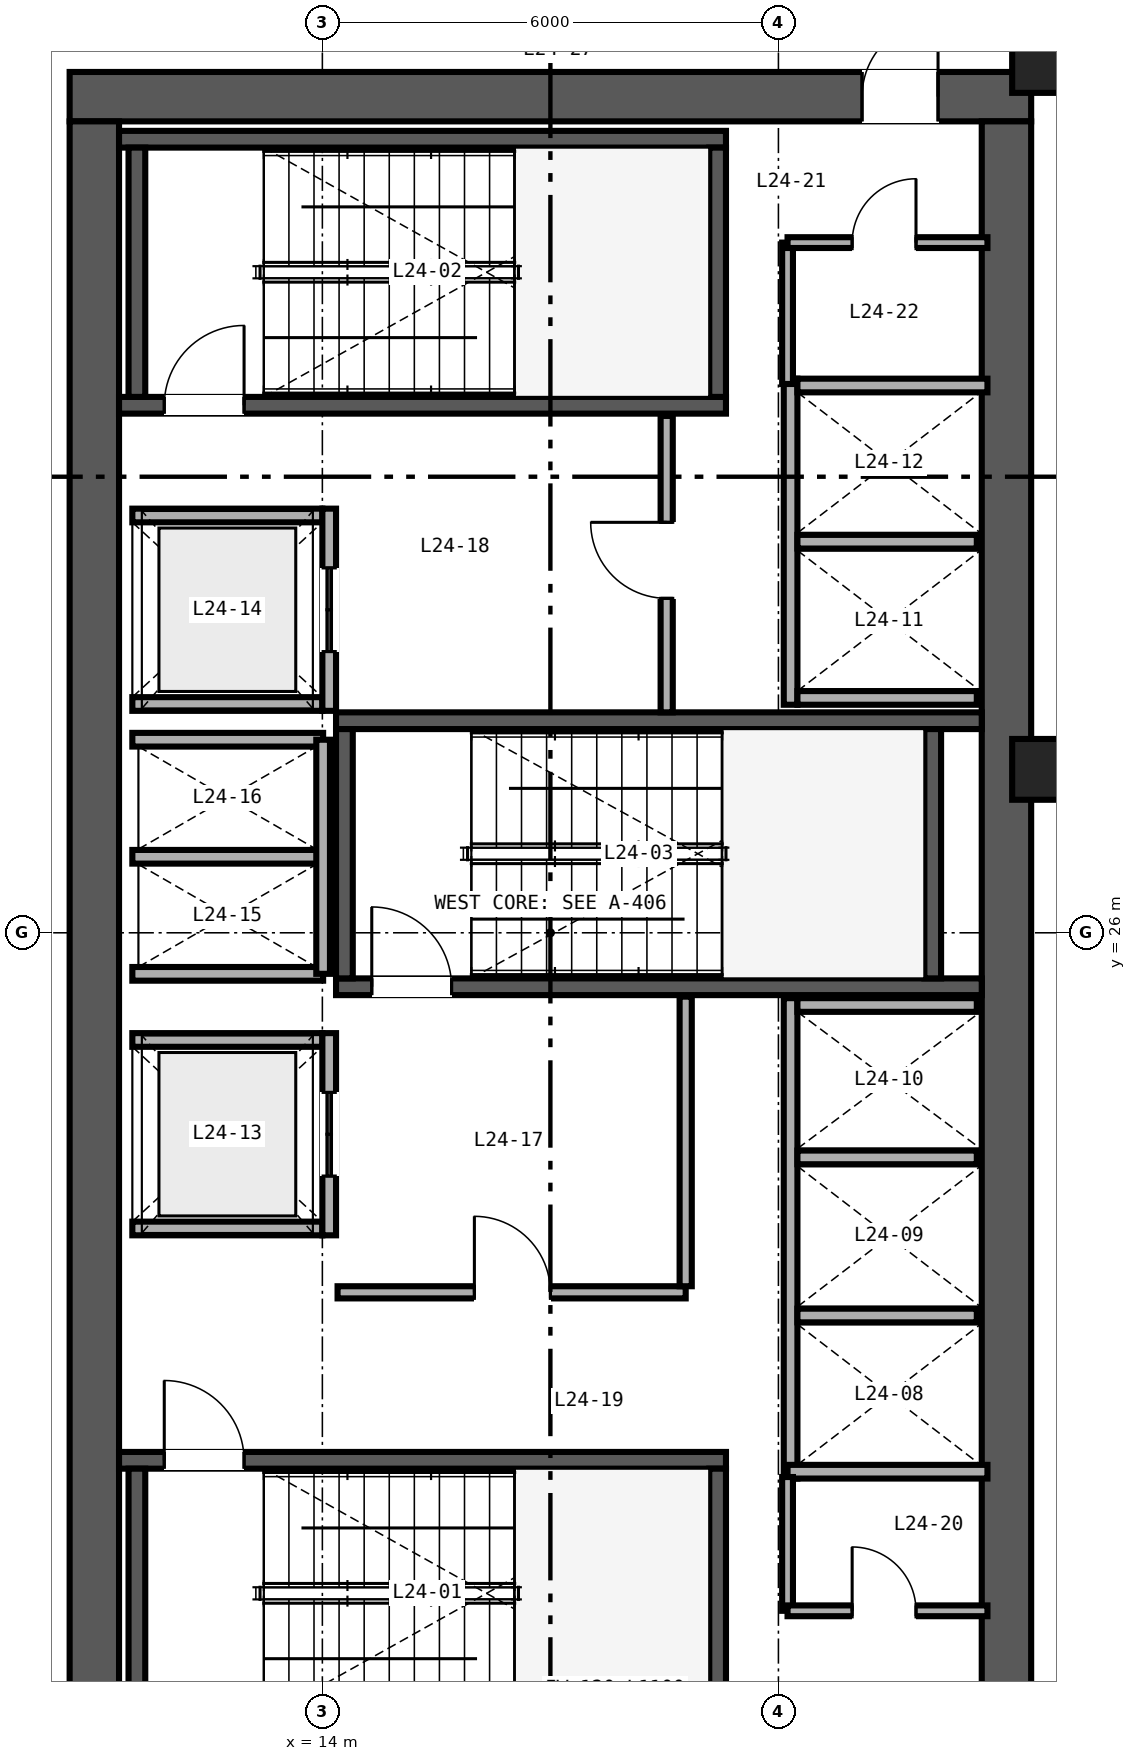
"""IFC4 building model, lengths in metres.
Left out: names, types, materials, properties, quantities, classifications, styles, units other than length and angle.
Written with IfcOpenShell. Run it as: python <this file> out.ifc"""

import sys

from ifc_helpers import new_model, si_unit, direction, frame, frame_2d, origin, origin_2d, place, context, subcontext, project, spatial, rectangle, hollow_rectangle, extrude, source, transform, mapped, element, fill, save


model = new_model("IFC4")
c1 = context("Model", 3, precision=1e-05, world=origin(), true_north=direction((0.0, 1.0)))
c2 = subcontext(c1, "Body", "Model", "MODEL_VIEW")
j1 = project(units=[si_unit("LENGTHUNIT", "METRE"), si_unit("PLANEANGLEUNIT", "RADIAN")], contexts=[c1])
p1 = place(None, origin())
s1 = spatial("IfcSite", under=j1, at=p1, CompositionType="ELEMENT")
p2 = place(p1, origin())
s2 = spatial("IfcBuilding", under=s1, at=p2, CompositionType="ELEMENT")
p3 = place(p2, frame((0.0, 0.0, 100.8)))
s3 = spatial("IfcBuildingStorey", under=s2, at=p3, CompositionType="ELEMENT", Elevation=100.8)
p4 = place(p3, frame((10.675, 37.0, 0.0), z_axis=(0.0, 0.0, 1.0), x_axis=(1.0, 0.0, 0.0)))
e1 = element("IfcWall", 1, at=p4, inside=s3, PredefinedType="SHEAR", context=c2, shape_type="SweptSolid", body=[
    extrude(rectangle(XDim=12.65, YDim=0.65, at=frame_2d((6.325, 0.0))), origin(), (0.0, 0.0, 1.0), 3.36),
])
p5 = place(p4, frame((10.425, 0.0, 0.0)))
e2 = element("IfcOpeningElement", 2, at=p5, cuts=e1, PredefinedType="OPENING", context=c2, shape_type="SweptSolid", body=[
    extrude(rectangle(XDim=1.0, YDim=2.15, at=frame_2d((0.5, 1.075))), frame((0.0, 0.335, 0.0), z_axis=(0.0, -1.0, 0.0), x_axis=(1.0, 0.0, 0.0)), (0.0, 0.0, 1.0), 0.67),
])
for number, where, z_axis, x_axis in (
    (3, (11.0, 15.325, 0.0), (0.0, 0.0, 1.0), (0.0, 1.0, 0.0)),
    (4, (23.0, 15.325, 0.0), (0.0, 0.0, 1.0), (0.0, 1.0, 0.0)),
):
    element("IfcWall", number, at=place(p3, frame(where, z_axis=z_axis, x_axis=x_axis)), inside=s3, PredefinedType="SHEAR", context=c2, shape_type="SweptSolid", body=[
        extrude(rectangle(XDim=21.35, YDim=0.65, at=frame_2d((10.675, 0.0))), origin(), (0.0, 0.0, 1.0), 3.36),
    ])
p6 = place(p3, frame((11.325, 19.06, 0.0), z_axis=(0.0, 0.0, 1.0), x_axis=(1.0, 0.0, 0.0)))
e5 = element("IfcWall", 5, at=p6, inside=s3, PredefinedType="SHEAR", context=c2, shape_type="SweptSolid", body=[
    extrude(rectangle(XDim=7.985, YDim=0.22, at=frame_2d((3.993, 0.0))), origin(), (0.0, 0.0, 1.0), 3.4),
])
p7 = place(p6, frame((0.595, 0.0, 0.0)))
e6 = element("IfcOpeningElement", 6, at=p7, cuts=e5, PredefinedType="OPENING", context=c2, shape_type="SweptSolid", body=[
    extrude(rectangle(XDim=1.05, YDim=2.15, at=frame_2d((0.525, 1.075))), frame((0.0, 0.12, 0.0), z_axis=(0.0, -1.0, 0.0), x_axis=(1.0, 0.0, 0.0)), (0.0, 0.0, 1.0), 0.24),
])
for number, where, z_axis, x_axis in (
    (7, (11.56, 15.67, 0.0), (0.0, 0.0, 1.0), (0.0, 1.0, 0.0)),
    (8, (19.2, 15.67, 0.0), (0.0, 0.0, 1.0), (0.0, 1.0, 0.0)),
):
    element("IfcWall", number, at=place(p3, frame(where, z_axis=z_axis, x_axis=x_axis)), inside=s3, PredefinedType="SHEAR", context=c2, shape_type="SweptSolid", body=[
        extrude(rectangle(XDim=3.28, YDim=0.22, at=frame_2d((1.64, 0.0))), origin(), (0.0, 0.0, 1.0), 3.4),
    ])
p8 = place(p3, frame((11.325, 32.94, 0.0), z_axis=(0.0, 0.0, 1.0), x_axis=(1.0, 0.0, 0.0)))
e9 = element("IfcWall", 9, at=p8, inside=s3, PredefinedType="SHEAR", context=c2, shape_type="SweptSolid", body=[
    extrude(rectangle(XDim=7.985, YDim=0.22, at=frame_2d((3.993, 0.0))), origin(), (0.0, 0.0, 1.0), 3.4),
])
p9 = place(p8, frame((0.595, 0.0, 0.0)))
e10 = element("IfcOpeningElement", 10, at=p9, cuts=e9, PredefinedType="OPENING", context=c2, shape_type="SweptSolid", body=[
    extrude(rectangle(XDim=1.05, YDim=2.15, at=frame_2d((0.525, 1.075))), frame((0.0, 0.12, 0.0), z_axis=(0.0, -1.0, 0.0), x_axis=(1.0, 0.0, 0.0)), (0.0, 0.0, 1.0), 0.24),
])
p10 = place(p3, frame((11.325, 36.44, 0.0), z_axis=(0.0, 0.0, 1.0), x_axis=(1.0, 0.0, 0.0)))
e11 = element("IfcWall", 11, at=p10, inside=s3, PredefinedType="SHEAR", context=c2, shape_type="SweptSolid", body=[
    extrude(rectangle(XDim=7.985, YDim=0.22, at=frame_2d((3.993, 0.0))), origin(), (0.0, 0.0, 1.0), 3.4),
])
for number, where, z_axis, x_axis in (
    (12, (11.56, 33.05, 0.0), (0.0, 0.0, 1.0), (0.0, 1.0, 0.0)),
    (13, (19.2, 33.05, 0.0), (0.0, 0.0, 1.0), (0.0, 1.0, 0.0)),
):
    element("IfcWall", number, at=place(p3, frame(where, z_axis=z_axis, x_axis=x_axis)), inside=s3, PredefinedType="SHEAR", context=c2, shape_type="SweptSolid", body=[
        extrude(rectangle(XDim=3.28, YDim=0.22, at=frame_2d((1.64, 0.0))), origin(), (0.0, 0.0, 1.0), 3.4),
    ])
p11 = place(p3, frame((14.18, 25.29, 0.0), z_axis=(0.0, 0.0, 1.0), x_axis=(1.0, 0.0, 0.0)))
e14 = element("IfcWall", 14, at=p11, inside=s3, PredefinedType="SHEAR", context=c2, shape_type="SweptSolid", body=[
    extrude(rectangle(XDim=8.495, YDim=0.22, at=frame_2d((4.248, 0.0))), origin(), (0.0, 0.0, 1.0), 3.4),
])
p12 = place(p11, frame((0.47, 0.0, 0.0)))
e15 = element("IfcOpeningElement", 15, at=p12, cuts=e14, PredefinedType="OPENING", context=c2, shape_type="SweptSolid", body=[
    extrude(rectangle(XDim=1.05, YDim=2.15, at=frame_2d((0.525, 1.075))), frame((0.0, 0.12, 0.0), z_axis=(0.0, -1.0, 0.0), x_axis=(1.0, 0.0, 0.0)), (0.0, 0.0, 1.0), 0.24),
])
p13 = place(p3, frame((14.18, 28.79, 0.0), z_axis=(0.0, 0.0, 1.0), x_axis=(1.0, 0.0, 0.0)))
e16 = element("IfcWall", 16, at=p13, inside=s3, PredefinedType="SHEAR", context=c2, shape_type="SweptSolid", body=[
    extrude(rectangle(XDim=8.495, YDim=0.22, at=frame_2d((4.248, 0.0))), origin(), (0.0, 0.0, 1.0), 3.4),
])
for number, where, z_axis, x_axis in (
    (17, (14.29, 25.4, 0.0), (0.0, 0.0, 1.0), (0.0, 1.0, 0.0)),
    (18, (22.03, 25.4, 0.0), (0.0, 0.0, 1.0), (0.0, 1.0, 0.0)),
):
    element("IfcWall", number, at=place(p3, frame(where, z_axis=z_axis, x_axis=x_axis)), inside=s3, PredefinedType="SHEAR", context=c2, shape_type="SweptSolid", body=[
        extrude(rectangle(XDim=3.28, YDim=0.22, at=frame_2d((1.64, 0.0))), origin(), (0.0, 0.0, 1.0), 3.4),
    ])
m1 = source(origin(), c2, "Body", "SweptSolid", [
    extrude(hollow_rectangle(XDim=0.85, YDim=0.8, WallThickness=0.032, at=origin_2d()), origin(), (0.0, 0.0, 1.0), 3.36),
])
for number, where, z_axis, x_axis in (
    (19, (23.5, 28.15, 0.0), (0.0, 0.0, 1.0), (1.0, 0.0, 0.0)),
    (20, (23.5, 37.45, 0.0), (0.0, 0.0, 1.0), (1.0, 0.0, 0.0)),
):
    element("IfcColumn", number, at=place(p3, frame(where, z_axis=z_axis, x_axis=x_axis)), inside=s3, PredefinedType="COLUMN", context=c2, shape_type="MappedRepresentation", body=[
        mapped(m1, transform((0.0, 0.0, 0.0), scale=1.0)),
    ])
p14 = place(p3, frame((20.16, 18.82, 0.0), z_axis=(0.0, 0.0, 1.0), x_axis=(0.0, 1.0, 0.0)))
e21 = element("IfcWall", 21, at=p14, inside=s3, PredefinedType="SOLIDWALL", context=c2, shape_type="SweptSolid", body=[
    extrude(rectangle(XDim=6.32, YDim=0.18, at=frame_2d((3.16, 0.0))), origin(), (0.0, 0.0, 1.0), 2.36),
])
p15 = place(p3, frame((20.12, 18.91, 0.0), z_axis=(0.0, 0.0, 1.0), x_axis=(1.0, 0.0, 0.0)))
e22 = element("IfcWall", 22, at=p15, inside=s3, PredefinedType="SOLIDWALL", context=c2, shape_type="SweptSolid", body=[
    extrude(rectangle(XDim=2.63, YDim=0.18, at=frame_2d((1.315, 0.0))), origin(), (0.0, 0.0, 1.0), 3.36),
])
p16 = place(p3, frame((20.25, 25.05, 0.0), z_axis=(0.0, 0.0, 1.0), x_axis=(1.0, 0.0, 0.0)))
e23 = element("IfcWall", 23, at=p16, inside=s3, PredefinedType="SOLIDWALL", context=c2, shape_type="SweptSolid", body=[
    extrude(rectangle(XDim=2.36, YDim=0.18, at=frame_2d((1.18, 0.0))), origin(), (0.0, 0.0, 1.0), 3.36),
])
p17 = place(p3, frame((20.25, 20.965, 0.0), z_axis=(0.0, 0.0, 1.0), x_axis=(1.0, 0.0, 0.0)))
e24 = element("IfcWall", 24, at=p17, inside=s3, PredefinedType="SOLIDWALL", context=c2, shape_type="SweptSolid", body=[
    extrude(rectangle(XDim=2.36, YDim=0.18, at=frame_2d((1.18, 0.0))), origin(), (0.0, 0.0, 1.0), 2.36),
])
p18 = place(p3, frame((20.25, 23.045, 0.0), z_axis=(0.0, 0.0, 1.0), x_axis=(1.0, 0.0, 0.0)))
e25 = element("IfcWall", 25, at=p18, inside=s3, PredefinedType="SOLIDWALL", context=c2, shape_type="SweptSolid", body=[
    extrude(rectangle(XDim=2.36, YDim=0.18, at=frame_2d((1.18, 0.0))), origin(), (0.0, 0.0, 1.0), 3.36),
])
p19 = place(p3, frame((20.16, 29.0, 0.0), z_axis=(0.0, 0.0, 1.0), x_axis=(0.0, 1.0, 0.0)))
e26 = element("IfcWall", 26, at=p19, inside=s3, PredefinedType="SOLIDWALL", context=c2, shape_type="SweptSolid", body=[
    extrude(rectangle(XDim=4.29, YDim=0.18, at=frame_2d((2.145, 0.0))), origin(), (0.0, 0.0, 1.0), 3.36),
])
p20 = place(p3, frame((20.25, 29.09, 0.0), z_axis=(0.0, 0.0, 1.0), x_axis=(1.0, 0.0, 0.0)))
e27 = element("IfcWall", 27, at=p20, inside=s3, PredefinedType="SOLIDWALL", context=c2, shape_type="SweptSolid", body=[
    extrude(rectangle(XDim=2.36, YDim=0.18, at=frame_2d((1.18, 0.0))), origin(), (0.0, 0.0, 1.0), 3.36),
])
p21 = place(p3, frame((20.25, 33.2, 0.0), z_axis=(0.0, 0.0, 1.0), x_axis=(1.0, 0.0, 0.0)))
e28 = element("IfcWall", 28, at=p21, inside=s3, PredefinedType="SOLIDWALL", context=c2, shape_type="SweptSolid", body=[
    extrude(rectangle(XDim=2.5, YDim=0.18, at=frame_2d((1.25, 0.0))), origin(), (0.0, 0.0, 1.0), 3.36),
])
p22 = place(p3, frame((20.25, 31.145, 0.0), z_axis=(0.0, 0.0, 1.0), x_axis=(1.0, 0.0, 0.0)))
e29 = element("IfcWall", 29, at=p22, inside=s3, PredefinedType="SOLIDWALL", context=c2, shape_type="SweptSolid", body=[
    extrude(rectangle(XDim=2.36, YDim=0.18, at=frame_2d((1.18, 0.0))), origin(), (0.0, 0.0, 1.0), 3.36),
])
for number, where, z_axis, x_axis in (
    (30, (11.5, 22.11, 0.0), (0.0, 0.0, 1.0), (1.0, 0.0, 0.0)),
    (31, (11.5, 24.59, 0.0), (0.0, 0.0, 1.0), (1.0, 0.0, 0.0)),
):
    element("IfcWall", number, at=place(p3, frame(where, z_axis=z_axis, x_axis=x_axis)), inside=s3, PredefinedType="SOLIDWALL", context=c2, shape_type="SweptSolid", body=[
        extrude(rectangle(XDim=2.5, YDim=0.18, at=frame_2d((1.25, 0.0))), origin(), (0.0, 0.0, 1.0), 3.36),
    ])
p23 = place(p3, frame((14.09, 22.02, 0.0), z_axis=(0.0, 0.0, 1.0), x_axis=(0.0, 1.0, 0.0)))
e32 = element("IfcWall", 32, at=p23, inside=s3, PredefinedType="SOLIDWALL", context=c2, shape_type="SweptSolid", body=[
    extrude(rectangle(XDim=2.66, YDim=0.18, at=frame_2d((1.33, 0.0))), origin(), (0.0, 0.0, 1.0), 3.36),
])
p24 = place(p23, frame((0.78, 0.0, 0.0)))
e33 = element("IfcOpeningElement", 33, at=p24, cuts=e32, PredefinedType="OPENING", context=c2, shape_type="SweptSolid", body=[
    extrude(rectangle(XDim=1.1, YDim=2.2, at=frame_2d((0.55, 1.1))), frame((0.0, 0.1, 0.0), z_axis=(0.0, -1.0, 0.0), x_axis=(1.0, 0.0, 0.0)), (0.0, 0.0, 1.0), 0.2),
])
for number, where, z_axis, x_axis in (
    (34, (11.5, 29.01, 0.0), (0.0, 0.0, 1.0), (1.0, 0.0, 0.0)),
    (35, (11.5, 31.49, 0.0), (0.0, 0.0, 1.0), (1.0, 0.0, 0.0)),
):
    element("IfcWall", number, at=place(p3, frame(where, z_axis=z_axis, x_axis=x_axis)), inside=s3, PredefinedType="SOLIDWALL", context=c2, shape_type="SweptSolid", body=[
        extrude(rectangle(XDim=2.5, YDim=0.18, at=frame_2d((1.25, 0.0))), origin(), (0.0, 0.0, 1.0), 3.36),
    ])
p25 = place(p3, frame((14.09, 28.92, 0.0), z_axis=(0.0, 0.0, 1.0), x_axis=(0.0, 1.0, 0.0)))
e36 = element("IfcWall", 36, at=p25, inside=s3, PredefinedType="SOLIDWALL", context=c2, shape_type="SweptSolid", body=[
    extrude(rectangle(XDim=2.66, YDim=0.18, at=frame_2d((1.33, 0.0))), origin(), (0.0, 0.0, 1.0), 3.36),
])
p26 = place(p25, frame((0.78, 0.0, 0.0)))
e37 = element("IfcOpeningElement", 37, at=p26, cuts=e36, PredefinedType="OPENING", context=c2, shape_type="SweptSolid", body=[
    extrude(rectangle(XDim=1.1, YDim=2.2, at=frame_2d((0.55, 1.1))), frame((0.0, 0.1, 0.0), z_axis=(0.0, -1.0, 0.0), x_axis=(1.0, 0.0, 0.0)), (0.0, 0.0, 1.0), 0.2),
])
for number, where, z_axis, x_axis in (
    (38, (11.5, 25.46, 0.0), (0.0, 0.0, 1.0), (1.0, 0.0, 0.0)),
    (39, (11.5, 27.0, 0.0), (0.0, 0.0, 1.0), (1.0, 0.0, 0.0)),
    (40, (11.5, 28.54, 0.0), (0.0, 0.0, 1.0), (1.0, 0.0, 0.0)),
):
    element("IfcWall", number, at=place(p3, frame(where, z_axis=z_axis, x_axis=x_axis)), inside=s3, PredefinedType="SOLIDWALL", context=c2, shape_type="SweptSolid", body=[
        extrude(rectangle(XDim=2.51, YDim=0.18, at=frame_2d((1.255, 0.0))), origin(), (0.0, 0.0, 1.0), 3.36),
    ])
p27 = place(p3, frame((14.01, 25.46, 0.0), z_axis=(0.0, 0.0, 1.0), x_axis=(0.0, 1.0, 0.0)))
e41 = element("IfcWall", 41, at=p27, inside=s3, PredefinedType="SOLIDWALL", context=c2, shape_type="SweptSolid", body=[
    extrude(rectangle(XDim=3.08, YDim=0.18, at=frame_2d((1.54, 0.0))), origin(), (0.0, 0.0, 1.0), 3.36),
])
p28 = place(p3, frame((14.2, 21.27, 0.0), z_axis=(0.0, 0.0, 1.0), x_axis=(1.0, 0.0, 0.0)))
e42 = element("IfcWall", 42, at=p28, inside=s3, PredefinedType="PARTITIONING", context=c2, shape_type="SweptSolid", body=[
    extrude(rectangle(XDim=4.58, YDim=0.16, at=frame_2d((2.29, 0.0))), origin(), (0.0, 0.0, 1.0), 3.36),
])
p29 = place(p28, frame((1.8, 0.0, 0.0)))
e43 = element("IfcOpeningElement", 43, at=p29, cuts=e42, PredefinedType="OPENING", context=c2, shape_type="SweptSolid", body=[
    extrude(rectangle(XDim=1.0, YDim=2.15, at=frame_2d((0.5, 1.075))), frame((0.0, 0.09, 0.0), z_axis=(0.0, -1.0, 0.0), x_axis=(1.0, 0.0, 0.0)), (0.0, 0.0, 1.0), 0.18),
])
p30 = place(p3, frame((18.78, 21.35, 0.0), z_axis=(0.0, 0.0, 1.0), x_axis=(0.0, 1.0, 0.0)))
e44 = element("IfcWall", 44, at=p30, inside=s3, PredefinedType="PARTITIONING", context=c2, shape_type="SweptSolid", body=[
    extrude(rectangle(XDim=3.81, YDim=0.16, at=frame_2d((1.905, 0.0))), origin(), (0.0, 0.0, 1.0), 3.36),
])
p31 = place(p3, frame((18.53, 28.9, 0.0), z_axis=(0.0, 0.0, 1.0), x_axis=(0.0, 1.0, 0.0)))
e45 = element("IfcWall", 45, at=p31, inside=s3, PredefinedType="PARTITIONING", context=c2, shape_type="SweptSolid", body=[
    extrude(rectangle(XDim=3.9, YDim=0.16, at=frame_2d((1.95, 0.0))), origin(), (0.0, 0.0, 1.0), 3.36),
])
p32 = place(p31, frame((1.5, 0.0, 0.0)))
e46 = element("IfcOpeningElement", 46, at=p32, cuts=e45, PredefinedType="OPENING", context=c2, shape_type="SweptSolid", body=[
    extrude(rectangle(XDim=1.0, YDim=2.15, at=frame_2d((0.5, 1.075))), frame((0.0, 0.09, 0.0), z_axis=(0.0, -1.0, 0.0), x_axis=(1.0, 0.0, 0.0)), (0.0, 0.0, 1.0), 0.18),
])
p33 = place(p3, frame((20.12, 17.08, 0.0), z_axis=(0.0, 0.0, 1.0), x_axis=(0.0, 1.0, 0.0)))
e47 = element("IfcWall", 47, at=p33, inside=s3, PredefinedType="PARTITIONING", context=c2, shape_type="SweptSolid", body=[
    extrude(rectangle(XDim=1.76, YDim=0.142, at=frame_2d((0.88, 0.0))), origin(), (0.0, 0.0, 1.0), 3.36),
])
p34 = place(p3, frame((20.12, 17.08, 0.0), z_axis=(0.0, 0.0, 1.0), x_axis=(1.0, 0.0, 0.0)))
e48 = element("IfcWall", 48, at=p34, inside=s3, PredefinedType="PARTITIONING", context=c2, shape_type="SweptSolid", body=[
    extrude(rectangle(XDim=2.63, YDim=0.142, at=frame_2d((1.315, 0.0))), origin(), (0.0, 0.0, 1.0), 3.36),
])
p35 = place(p34, frame((0.85, 0.0, 0.0)))
e49 = element("IfcOpeningElement", 49, at=p35, cuts=e48, PredefinedType="OPENING", context=c2, shape_type="SweptSolid", body=[
    extrude(rectangle(XDim=0.84, YDim=2.1, at=frame_2d((0.42, 1.05))), frame((0.0, 0.081, 0.0), z_axis=(0.0, -1.0, 0.0), x_axis=(1.0, 0.0, 0.0)), (0.0, 0.0, 1.0), 0.162),
])
p36 = place(p3, frame((20.12, 33.22, 0.0), z_axis=(0.0, 0.0, 1.0), x_axis=(0.0, 1.0, 0.0)))
e50 = element("IfcWall", 50, at=p36, inside=s3, PredefinedType="PARTITIONING", context=c2, shape_type="SweptSolid", body=[
    extrude(rectangle(XDim=1.86, YDim=0.142, at=frame_2d((0.93, 0.0))), origin(), (0.0, 0.0, 1.0), 3.36),
])
p37 = place(p3, frame((20.12, 35.08, 0.0), z_axis=(0.0, 0.0, 1.0), x_axis=(1.0, 0.0, 0.0)))
e51 = element("IfcWall", 51, at=p37, inside=s3, PredefinedType="PARTITIONING", context=c2, shape_type="SweptSolid", body=[
    extrude(rectangle(XDim=2.63, YDim=0.142, at=frame_2d((1.315, 0.0))), origin(), (0.0, 0.0, 1.0), 3.36),
])
p38 = place(p37, frame((0.85, 0.0, 0.0)))
e52 = element("IfcOpeningElement", 52, at=p38, cuts=e51, PredefinedType="OPENING", context=c2, shape_type="SweptSolid", body=[
    extrude(rectangle(XDim=0.84, YDim=2.1, at=frame_2d((0.42, 1.05))), frame((0.0, 0.081, 0.0), z_axis=(0.0, -1.0, 0.0), x_axis=(1.0, 0.0, 0.0)), (0.0, 0.0, 1.0), 0.162),
])
m2 = source(origin(), c2, "Body", "SweptSolid", [
    extrude(rectangle(XDim=1.05, YDim=2.15, at=frame_2d((0.525, 1.075))), frame((0.0, 0.025, 0.0), z_axis=(0.0, -1.0, 0.0), x_axis=(1.0, 0.0, 0.0)), (0.0, 0.0, 1.0), 0.05),
])
p39 = place(p7, origin())
e53 = element("IfcDoor", 53, at=p39, inside=s3, OperationType="SINGLE_SWING_LEFT", PredefinedType="DOOR", context=c2, shape_type="MappedRepresentation", body=[
    mapped(m2, transform((0.0, 0.0, 0.0), scale=1.0)),
])
fill(e6, e53)
p40 = place(p9, origin())
e54 = element("IfcDoor", 54, at=p40, inside=s3, OperationType="SINGLE_SWING_RIGHT", PredefinedType="DOOR", context=c2, shape_type="MappedRepresentation", body=[
    mapped(m2, transform((0.0, 0.0, 0.0), scale=1.0)),
])
fill(e10, e54)
p41 = place(p12, origin())
e55 = element("IfcDoor", 55, at=p41, inside=s3, OperationType="SINGLE_SWING_LEFT", PredefinedType="DOOR", context=c2, shape_type="MappedRepresentation", body=[
    mapped(m2, transform((0.0, 0.0, 0.0), scale=1.0)),
])
fill(e15, e55)
m3 = source(origin(), c2, "Body", "SweptSolid", [
    extrude(rectangle(XDim=1.1, YDim=2.2, at=frame_2d((0.55, 1.1))), frame((0.0, 0.025, 0.0), z_axis=(0.0, -1.0, 0.0), x_axis=(1.0, 0.0, 0.0)), (0.0, 0.0, 1.0), 0.05),
])
p42 = place(p24, origin())
e56 = element("IfcDoor", 56, at=p42, inside=s3, OperationType="DOUBLE_DOOR_SLIDING", PredefinedType="DOOR", context=c2, shape_type="MappedRepresentation", body=[
    mapped(m3, transform((0.0, 0.0, 0.0), scale=1.0)),
])
fill(e33, e56)
p43 = place(p26, origin())
e57 = element("IfcDoor", 57, at=p43, inside=s3, OperationType="DOUBLE_DOOR_SLIDING", PredefinedType="DOOR", context=c2, shape_type="MappedRepresentation", body=[
    mapped(m3, transform((0.0, 0.0, 0.0), scale=1.0)),
])
fill(e37, e57)
m4 = source(origin(), c2, "Body", "SweptSolid", [
    extrude(rectangle(XDim=1.0, YDim=2.15, at=frame_2d((0.5, 1.075))), frame((0.0, 0.025, 0.0), z_axis=(0.0, -1.0, 0.0), x_axis=(1.0, 0.0, 0.0)), (0.0, 0.0, 1.0), 0.05),
])
p44 = place(p29, origin())
e58 = element("IfcDoor", 58, at=p44, inside=s3, OperationType="SINGLE_SWING_LEFT", PredefinedType="DOOR", context=c2, shape_type="MappedRepresentation", body=[
    mapped(m4, transform((0.0, 0.0, 0.0), scale=1.0)),
])
fill(e43, e58)
p45 = place(p32, origin())
e59 = element("IfcDoor", 59, at=p45, inside=s3, OperationType="SINGLE_SWING_RIGHT", PredefinedType="DOOR", context=c2, shape_type="MappedRepresentation", body=[
    mapped(m4, transform((0.0, 0.0, 0.0), scale=1.0)),
])
fill(e46, e59)
m5 = source(origin(), c2, "Body", "SweptSolid", [
    extrude(rectangle(XDim=0.84, YDim=2.1, at=frame_2d((0.42, 1.05))), frame((0.0, 0.025, 0.0), z_axis=(0.0, -1.0, 0.0), x_axis=(1.0, 0.0, 0.0)), (0.0, 0.0, 1.0), 0.05),
])
p46 = place(p35, origin())
e60 = element("IfcDoor", 60, at=p46, inside=s3, OperationType="SINGLE_SWING_LEFT", PredefinedType="DOOR", context=c2, shape_type="MappedRepresentation", body=[
    mapped(m5, transform((0.0, 0.0, 0.0), scale=1.0)),
])
fill(e49, e60)
p47 = place(p38, origin())
e61 = element("IfcDoor", 61, at=p47, inside=s3, OperationType="SINGLE_SWING_RIGHT", PredefinedType="DOOR", context=c2, shape_type="MappedRepresentation", body=[
    mapped(m5, transform((0.0, 0.0, 0.0), scale=1.0)),
])
fill(e52, e61)
p48 = place(p5, origin())
e62 = element("IfcDoor", 62, at=p48, inside=s3, OperationType="SINGLE_SWING_RIGHT", PredefinedType="DOOR", context=c2, shape_type="MappedRepresentation", body=[
    mapped(m4, transform((0.0, 0.0, 0.0), scale=1.0)),
])
fill(e2, e62)
save(model, sys.argv[1])
